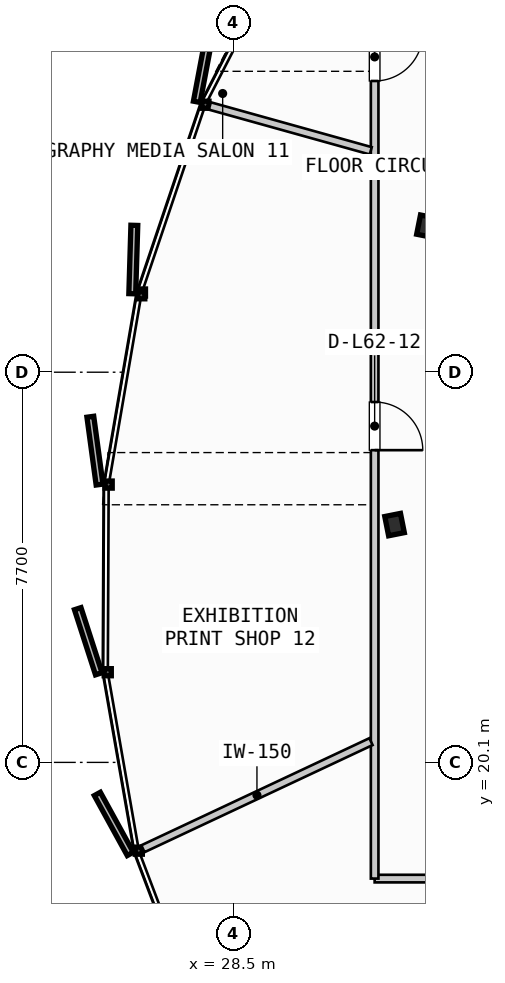
"""IFC4 building model, lengths in metres.
Left out: names, types, materials, properties, quantities, classifications, styles, units other than length and angle.
Written with IfcOpenShell. Run it as: python <this file> out.ifc"""

import sys

from ifc_helpers import new_model, si_unit, direction, frame, frame_2d, origin, origin_2d, place, context, subcontext, project, spatial, rectangle, i_section, extrude, source, transform, mapped, element, fill, save


model = new_model("IFC4")
c1 = context("Model", 3, precision=1e-05, world=origin(), true_north=direction((0.0, 1.0)))
c2 = subcontext(c1, "Body", "Model", "MODEL_VIEW")
j1 = project(units=[si_unit("LENGTHUNIT", "METRE"), si_unit("PLANEANGLEUNIT", "RADIAN")], contexts=[c1])
p1 = place(None, origin())
s1 = spatial("IfcSite", under=j1, at=p1, CompositionType="ELEMENT")
p2 = place(p1, origin())
s2 = spatial("IfcBuilding", under=s1, at=p2, CompositionType="ELEMENT")
p3 = place(p2, frame((0.0, 0.0, 238.75)))
s3 = spatial("IfcBuildingStorey", under=s2, at=p3, CompositionType="ELEMENT", Elevation=238.75)
m1 = source(origin(), c2, "Body", "SweptSolid", [
    extrude(i_section(OverallWidth=0.387, OverallDepth=0.316, WebThickness=0.019, FlangeThickness=0.028, FilletRadius=0.015, at=origin_2d()), origin(), (0.0, 0.0, 1.0), 3.21),
])
for number, where, z_axis, x_axis in (
    (1, (32.312, 30.682, 0.0), (0.0, 0.0, 1.0), (-0.981, 0.195, 0.0)),
    (2, (31.683, 24.793, 0.0), (0.0, 0.0, 1.0), (-0.981, -0.195, 0.0)),
):
    element("IfcColumn", number, at=place(p3, frame(where, z_axis=z_axis, x_axis=x_axis)), inside=s3, PredefinedType="COLUMN", context=c2, shape_type="MappedRepresentation", body=[
        mapped(m1, transform((0.0, 0.0, 0.0), scale=1.0)),
    ])
p4 = place(p3, frame((31.29, 17.807, 0.0), z_axis=(0.0, 0.0, 1.0), x_axis=(1.0, 0.0, 0.0)))
e3 = element("IfcWall", 3, at=p4, inside=s3, PredefinedType="PARTITIONING", context=c2, shape_type="SweptSolid", body=[
    extrude(rectangle(XDim=30.274, YDim=0.15, at=frame_2d((15.137, 0.0))), origin(), (0.0, 0.0, 1.0), 2.28),
])
p5 = place(p4, frame((5.45, 0.0, 0.0)))
e4 = element("IfcOpeningElement", 4, at=p5, cuts=e3, PredefinedType="OPENING", context=c2, shape_type="SweptSolid", body=[
    extrude(rectangle(XDim=0.95, YDim=2.15, at=frame_2d((0.475, 1.075))), frame((0.0, 0.085, 0.0), z_axis=(0.0, -1.0, 0.0), x_axis=(1.0, 0.0, 0.0)), (0.0, 0.0, 1.0), 0.17),
])
p6 = place(p4, frame((12.459, 0.0, 0.0)))
e5 = element("IfcOpeningElement", 5, at=p6, cuts=e3, PredefinedType="OPENING", context=c2, shape_type="SweptSolid", body=[
    extrude(rectangle(XDim=0.95, YDim=2.15, at=frame_2d((0.475, 1.075))), frame((0.0, 0.085, 0.0), z_axis=(0.0, -1.0, 0.0), x_axis=(1.0, 0.0, 0.0)), (0.0, 0.0, 1.0), 0.17),
])
p7 = place(p4, frame((17.094, 0.0, 0.0)))
e6 = element("IfcOpeningElement", 6, at=p7, cuts=e3, PredefinedType="OPENING", context=c2, shape_type="SweptSolid", body=[
    extrude(rectangle(XDim=0.95, YDim=2.15, at=frame_2d((0.475, 1.075))), frame((0.0, 0.085, 0.0), z_axis=(0.0, -1.0, 0.0), x_axis=(1.0, 0.0, 0.0)), (0.0, 0.0, 1.0), 0.17),
])
p8 = place(p4, frame((23.641, 0.0, 0.0)))
e7 = element("IfcOpeningElement", 7, at=p8, cuts=e3, PredefinedType="OPENING", context=c2, shape_type="SweptSolid", body=[
    extrude(rectangle(XDim=0.95, YDim=2.15, at=frame_2d((0.475, 1.075))), frame((0.0, 0.085, 0.0), z_axis=(0.0, -1.0, 0.0), x_axis=(1.0, 0.0, 0.0)), (0.0, 0.0, 1.0), 0.17),
])
p9 = place(p3, frame((31.29, 37.793, 0.0), z_axis=(0.0, 0.0, 1.0), x_axis=(0.0, -1.0, 0.0)))
e8 = element("IfcWall", 8, at=p9, inside=s3, PredefinedType="PARTITIONING", context=c2, shape_type="SweptSolid", body=[
    extrude(rectangle(XDim=19.986, YDim=0.15, at=frame_2d((9.993, 0.0))), origin(), (0.0, 0.0, 1.0), 2.28),
])
p10 = place(p9, frame((3.296, 0.0, 0.0)))
e9 = element("IfcOpeningElement", 9, at=p10, cuts=e8, PredefinedType="OPENING", context=c2, shape_type="SweptSolid", body=[
    extrude(rectangle(XDim=0.95, YDim=2.15, at=frame_2d((0.475, 1.075))), frame((0.0, 0.085, 0.0), z_axis=(0.0, -1.0, 0.0), x_axis=(1.0, 0.0, 0.0)), (0.0, 0.0, 1.0), 0.17),
])
p11 = place(p9, frame((10.581, 0.0, 0.0)))
e10 = element("IfcOpeningElement", 10, at=p11, cuts=e8, PredefinedType="OPENING", context=c2, shape_type="SweptSolid", body=[
    extrude(rectangle(XDim=0.95, YDim=2.15, at=frame_2d((0.475, 1.075))), frame((0.0, 0.085, 0.0), z_axis=(0.0, -1.0, 0.0), x_axis=(1.0, 0.0, 0.0)), (0.0, 0.0, 1.0), 0.17),
])
p12 = place(p3, frame((31.218, 20.51, 0.0), z_axis=(0.0, 0.0, 1.0), x_axis=(-0.905164470227, -0.425061503594, 0.0)))
e11 = element("IfcWall", 11, at=p12, inside=s3, PredefinedType="PARTITIONING", context=c2, shape_type="SweptSolid", body=[
    extrude(rectangle(XDim=4.972, YDim=0.15, at=frame_2d((2.486, 0.0))), origin(), (0.0, 0.0, 1.0), 2.28),
])
p13 = place(p3, frame((31.213, 32.169, 0.0), z_axis=(0.0, 0.0, 1.0), x_axis=(-0.963294777141, 0.268445846182, 0.0)))
e12 = element("IfcWall", 12, at=p13, inside=s3, PredefinedType="PARTITIONING", context=c2, shape_type="SweptSolid", body=[
    extrude(rectangle(XDim=3.297, YDim=0.15, at=frame_2d((1.648, 0.0))), origin(), (0.0, 0.0, 1.0), 2.28),
])
m2 = source(origin(), c2, "Body", "SweptSolid", [
    extrude(rectangle(XDim=0.95, YDim=2.15, at=frame_2d((0.475, 1.075))), frame((0.0, 0.025, 0.0), z_axis=(0.0, -1.0, 0.0), x_axis=(1.0, 0.0, 0.0)), (0.0, 0.0, 1.0), 0.05),
])
p14 = place(p10, origin())
e13 = element("IfcDoor", 13, at=p14, inside=s3, OperationType="SINGLE_SWING_LEFT", PredefinedType="DOOR", context=c2, shape_type="MappedRepresentation", body=[
    mapped(m2, transform((0.0, 0.0, 0.0), scale=1.0)),
])
fill(e9, e13)
p15 = place(p11, origin())
e14 = element("IfcDoor", 14, at=p15, inside=s3, OperationType="SINGLE_SWING_RIGHT", PredefinedType="DOOR", context=c2, shape_type="MappedRepresentation", body=[
    mapped(m2, transform((0.0, 0.0, 0.0), scale=1.0)),
])
fill(e10, e14)
save(model, sys.argv[1])
